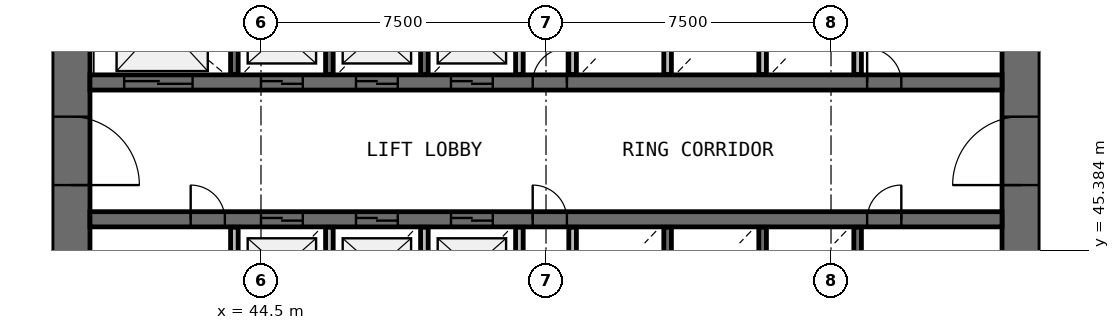
"""IFC4 building model, lengths in metres.
Left out: names, types, materials, properties, quantities, classifications, styles, units other than length and angle.
Written with IfcOpenShell. Run it as: python <this file> out.ifc"""

import sys

from ifc_helpers import new_model, si_unit, direction, frame, frame_2d, origin, place, context, subcontext, project, spatial, rectangle, extrude, source, transform, mapped, element, fill, save


model = new_model("IFC4")
c1 = context("Model", 3, precision=1e-05, world=origin(), true_north=direction((0.0, 1.0)))
c2 = subcontext(c1, "Body", "Model", "MODEL_VIEW")
j1 = project(units=[si_unit("LENGTHUNIT", "METRE"), si_unit("PLANEANGLEUNIT", "RADIAN")], contexts=[c1])
p1 = place(None, origin())
s1 = spatial("IfcSite", under=j1, at=p1, CompositionType="ELEMENT")
p2 = place(p1, origin())
s2 = spatial("IfcBuilding", under=s1, at=p2, CompositionType="ELEMENT")
p3 = place(p2, frame((0.0, 0.0, 44.6)))
s3 = spatial("IfcBuildingStorey", under=s2, at=p3, CompositionType="ELEMENT", Elevation=44.6)
p4 = place(p3, frame((64.5, 38.0, 0.0), z_axis=(0.0, 0.0, 1.0), x_axis=(0.0, 1.0, 0.0)))
e1 = element("IfcWall", 1, at=p4, inside=s3, PredefinedType="SHEAR", context=c2, shape_type="SweptSolid", body=[
    extrude(rectangle(XDim=20.0, YDim=1.0, at=frame_2d((10.0, 0.0))), origin(), (0.0, 0.0, 1.0), 4.4),
])
p5 = place(p4, frame((9.1, 0.0, 0.0)))
e2 = element("IfcOpeningElement", 2, at=p5, cuts=e1, PredefinedType="OPENING", context=c2, shape_type="SweptSolid", body=[
    extrude(rectangle(XDim=1.8, YDim=2.1, at=frame_2d((0.9, 1.05))), frame((0.0, 0.51, 0.0), z_axis=(0.0, -1.0, 0.0), x_axis=(1.0, 0.0, 0.0)), (0.0, 0.0, 1.0), 1.02),
])
p6 = place(p3, frame((39.5, 58.0, 0.0), z_axis=(0.0, 0.0, 1.0), x_axis=(0.0, -1.0, 0.0)))
e3 = element("IfcWall", 3, at=p6, inside=s3, PredefinedType="SHEAR", context=c2, shape_type="SweptSolid", body=[
    extrude(rectangle(XDim=20.0, YDim=1.0, at=frame_2d((10.0, 0.0))), origin(), (0.0, 0.0, 1.0), 4.4),
])
p7 = place(p6, frame((9.1, 0.0, 0.0)))
e4 = element("IfcOpeningElement", 4, at=p7, cuts=e3, PredefinedType="OPENING", context=c2, shape_type="SweptSolid", body=[
    extrude(rectangle(XDim=1.8, YDim=2.1, at=frame_2d((0.9, 1.05))), frame((0.0, 0.51, 0.0), z_axis=(0.0, -1.0, 0.0), x_axis=(1.0, 0.0, 0.0)), (0.0, 0.0, 1.0), 1.02),
])
p8 = place(p3, frame((40.0, 49.8, 0.0), z_axis=(0.0, 0.0, 1.0), x_axis=(1.0, 0.0, 0.0)))
e5 = element("IfcWall", 5, at=p8, inside=s3, PredefinedType="SHEAR", context=c2, shape_type="SweptSolid", body=[
    extrude(rectangle(XDim=24.0, YDim=0.4, at=frame_2d((12.0, 0.0))), origin(), (0.0, 0.0, 1.0), 4.4),
])
p9 = place(p8, frame((4.5, 0.0, 0.0)))
e6 = element("IfcOpeningElement", 6, at=p9, cuts=e5, PredefinedType="OPENING", context=c2, shape_type="SweptSolid", body=[
    extrude(rectangle(XDim=1.1, YDim=2.1, at=frame_2d((0.55, 1.05))), frame((0.0, 0.21, 0.0), z_axis=(0.0, -1.0, 0.0), x_axis=(1.0, 0.0, 0.0)), (0.0, 0.0, 1.0), 0.42),
])
p10 = place(p8, frame((7.0, 0.0, 0.0)))
e7 = element("IfcOpeningElement", 7, at=p10, cuts=e5, PredefinedType="OPENING", context=c2, shape_type="SweptSolid", body=[
    extrude(rectangle(XDim=1.1, YDim=2.1, at=frame_2d((0.55, 1.05))), frame((0.0, 0.21, 0.0), z_axis=(0.0, -1.0, 0.0), x_axis=(1.0, 0.0, 0.0)), (0.0, 0.0, 1.0), 0.42),
])
p11 = place(p8, frame((9.5, 0.0, 0.0)))
e8 = element("IfcOpeningElement", 8, at=p11, cuts=e5, PredefinedType="OPENING", context=c2, shape_type="SweptSolid", body=[
    extrude(rectangle(XDim=1.1, YDim=2.1, at=frame_2d((0.55, 1.05))), frame((0.0, 0.21, 0.0), z_axis=(0.0, -1.0, 0.0), x_axis=(1.0, 0.0, 0.0)), (0.0, 0.0, 1.0), 0.42),
])
p12 = place(p8, frame((0.9, 0.0, 0.0)))
e9 = element("IfcOpeningElement", 9, at=p12, cuts=e5, PredefinedType="OPENING", context=c2, shape_type="SweptSolid", body=[
    extrude(rectangle(XDim=1.8, YDim=2.4, at=frame_2d((0.9, 1.2))), frame((0.0, 0.21, 0.0), z_axis=(0.0, -1.0, 0.0), x_axis=(1.0, 0.0, 0.0)), (0.0, 0.0, 1.0), 0.42),
])
p13 = place(p8, frame((20.45, 0.0, 0.0)))
e10 = element("IfcOpeningElement", 10, at=p13, cuts=e5, PredefinedType="OPENING", context=c2, shape_type="SweptSolid", body=[
    extrude(rectangle(XDim=0.9, YDim=2.1, at=frame_2d((0.45, 1.05))), frame((0.0, 0.21, 0.0), z_axis=(0.0, -1.0, 0.0), x_axis=(1.0, 0.0, 0.0)), (0.0, 0.0, 1.0), 0.42),
])
p14 = place(p8, frame((11.65, 0.0, 0.0)))
e11 = element("IfcOpeningElement", 11, at=p14, cuts=e5, PredefinedType="OPENING", context=c2, shape_type="SweptSolid", body=[
    extrude(rectangle(XDim=0.9, YDim=2.1, at=frame_2d((0.45, 1.05))), frame((0.0, 0.21, 0.0), z_axis=(0.0, -1.0, 0.0), x_axis=(1.0, 0.0, 0.0)), (0.0, 0.0, 1.0), 0.42),
])
p15 = place(p3, frame((40.0, 46.2, 0.0), z_axis=(0.0, 0.0, 1.0), x_axis=(1.0, 0.0, 0.0)))
e12 = element("IfcWall", 12, at=p15, inside=s3, PredefinedType="SHEAR", context=c2, shape_type="SweptSolid", body=[
    extrude(rectangle(XDim=24.0, YDim=0.4, at=frame_2d((12.0, 0.0))), origin(), (0.0, 0.0, 1.0), 4.4),
])
p16 = place(p15, frame((4.5, 0.0, 0.0)))
e13 = element("IfcOpeningElement", 13, at=p16, cuts=e12, PredefinedType="OPENING", context=c2, shape_type="SweptSolid", body=[
    extrude(rectangle(XDim=1.1, YDim=2.1, at=frame_2d((0.55, 1.05))), frame((0.0, 0.21, 0.0), z_axis=(0.0, -1.0, 0.0), x_axis=(1.0, 0.0, 0.0)), (0.0, 0.0, 1.0), 0.42),
])
p17 = place(p15, frame((7.0, 0.0, 0.0)))
e14 = element("IfcOpeningElement", 14, at=p17, cuts=e12, PredefinedType="OPENING", context=c2, shape_type="SweptSolid", body=[
    extrude(rectangle(XDim=1.1, YDim=2.1, at=frame_2d((0.55, 1.05))), frame((0.0, 0.21, 0.0), z_axis=(0.0, -1.0, 0.0), x_axis=(1.0, 0.0, 0.0)), (0.0, 0.0, 1.0), 0.42),
])
p18 = place(p15, frame((9.5, 0.0, 0.0)))
e15 = element("IfcOpeningElement", 15, at=p18, cuts=e12, PredefinedType="OPENING", context=c2, shape_type="SweptSolid", body=[
    extrude(rectangle(XDim=1.1, YDim=2.1, at=frame_2d((0.55, 1.05))), frame((0.0, 0.21, 0.0), z_axis=(0.0, -1.0, 0.0), x_axis=(1.0, 0.0, 0.0)), (0.0, 0.0, 1.0), 0.42),
])
p19 = place(p15, frame((20.45, 0.0, 0.0)))
e16 = element("IfcOpeningElement", 16, at=p19, cuts=e12, PredefinedType="OPENING", context=c2, shape_type="SweptSolid", body=[
    extrude(rectangle(XDim=0.9, YDim=2.1, at=frame_2d((0.45, 1.05))), frame((0.0, 0.21, 0.0), z_axis=(0.0, -1.0, 0.0), x_axis=(1.0, 0.0, 0.0)), (0.0, 0.0, 1.0), 0.42),
])
p20 = place(p15, frame((2.65, 0.0, 0.0)))
e17 = element("IfcOpeningElement", 17, at=p20, cuts=e12, PredefinedType="OPENING", context=c2, shape_type="SweptSolid", body=[
    extrude(rectangle(XDim=0.9, YDim=2.1, at=frame_2d((0.45, 1.05))), frame((0.0, 0.21, 0.0), z_axis=(0.0, -1.0, 0.0), x_axis=(1.0, 0.0, 0.0)), (0.0, 0.0, 1.0), 0.42),
])
p21 = place(p15, frame((11.65, 0.0, 0.0)))
e18 = element("IfcOpeningElement", 18, at=p21, cuts=e12, PredefinedType="OPENING", context=c2, shape_type="SweptSolid", body=[
    extrude(rectangle(XDim=0.9, YDim=2.1, at=frame_2d((0.45, 1.05))), frame((0.0, 0.21, 0.0), z_axis=(0.0, -1.0, 0.0), x_axis=(1.0, 0.0, 0.0)), (0.0, 0.0, 1.0), 0.42),
])
for number, where, z_axis, x_axis in (
    (19, (43.8, 45.99, 0.0), (0.0, 0.0, 1.0), (0.0, -1.0, 0.0)),
    (20, (43.8, 52.37, 0.0), (0.0, 0.0, 1.0), (0.0, -1.0, 0.0)),
):
    element("IfcWall", number, at=place(p3, frame(where, z_axis=z_axis, x_axis=x_axis)), inside=s3, PredefinedType="SOLIDWALL", context=c2, shape_type="SweptSolid", body=[
        extrude(rectangle(XDim=2.36, YDim=0.2, at=frame_2d((1.18, 0.0))), origin(), (0.0, 0.0, 1.0), 3.95),
    ])
p22 = place(p3, frame((46.3, 43.6, 0.0), z_axis=(0.0, 0.0, 1.0), x_axis=(0.0, 1.0, 0.0)))
e21 = element("IfcWall", 21, at=p22, inside=s3, PredefinedType="SOLIDWALL", context=c2, shape_type="SweptSolid", body=[
    extrude(rectangle(XDim=2.39, YDim=0.2, at=frame_2d((1.195, 0.0))), origin(), (0.0, 0.0, 1.0), 3.95),
])
for number, where, z_axis, x_axis in (
    (22, (46.3, 50.01, 0.0), (0.0, 0.0, 1.0), (0.0, 1.0, 0.0)),
    (23, (48.8, 43.63, 0.0), (0.0, 0.0, 1.0), (0.0, 1.0, 0.0)),
    (24, (48.8, 50.01, 0.0), (0.0, 0.0, 1.0), (0.0, 1.0, 0.0)),
    (25, (51.3, 43.63, 0.0), (0.0, 0.0, 1.0), (0.0, 1.0, 0.0)),
):
    element("IfcWall", number, at=place(p3, frame(where, z_axis=z_axis, x_axis=x_axis)), inside=s3, PredefinedType="SOLIDWALL", context=c2, shape_type="SweptSolid", body=[
        extrude(rectangle(XDim=2.36, YDim=0.2, at=frame_2d((1.18, 0.0))), origin(), (0.0, 0.0, 1.0), 3.95),
    ])
for number, where, z_axis, x_axis in (
    (26, (51.3, 50.01, 0.0), (0.0, 0.0, 1.0), (0.0, 1.0, 0.0)),
    (27, (52.7, 45.99, 0.0), (0.0, 0.0, 1.0), (0.0, -1.0, 0.0)),
):
    element("IfcWall", number, at=place(p3, frame(where, z_axis=z_axis, x_axis=x_axis)), inside=s3, PredefinedType="SOLIDWALL", context=c2, shape_type="SweptSolid", body=[
        extrude(rectangle(XDim=2.39, YDim=0.2, at=frame_2d((1.195, 0.0))), origin(), (0.0, 0.0, 1.0), 3.95),
    ])
for number, where, z_axis, x_axis in (
    (28, (52.7, 52.37, 0.0), (0.0, 0.0, 1.0), (0.0, -1.0, 0.0)),
    (29, (55.2, 43.63, 0.0), (0.0, 0.0, 1.0), (0.0, 1.0, 0.0)),
    (30, (55.2, 50.01, 0.0), (0.0, 0.0, 1.0), (0.0, 1.0, 0.0)),
    (31, (57.7, 43.63, 0.0), (0.0, 0.0, 1.0), (0.0, 1.0, 0.0)),
):
    element("IfcWall", number, at=place(p3, frame(where, z_axis=z_axis, x_axis=x_axis)), inside=s3, PredefinedType="SOLIDWALL", context=c2, shape_type="SweptSolid", body=[
        extrude(rectangle(XDim=2.36, YDim=0.2, at=frame_2d((1.18, 0.0))), origin(), (0.0, 0.0, 1.0), 3.95),
    ])
p23 = place(p3, frame((57.7, 50.01, 0.0), z_axis=(0.0, 0.0, 1.0), x_axis=(0.0, 1.0, 0.0)))
e32 = element("IfcWall", 32, at=p23, inside=s3, PredefinedType="SOLIDWALL", context=c2, shape_type="SweptSolid", body=[
    extrude(rectangle(XDim=2.39, YDim=0.2, at=frame_2d((1.195, 0.0))), origin(), (0.0, 0.0, 1.0), 3.95),
])
for number, where, z_axis, x_axis in (
    (33, (60.2, 43.63, 0.0), (0.0, 0.0, 1.0), (0.0, 1.0, 0.0)),
    (34, (60.2, 50.01, 0.0), (0.0, 0.0, 1.0), (0.0, 1.0, 0.0)),
):
    element("IfcWall", number, at=place(p3, frame(where, z_axis=z_axis, x_axis=x_axis)), inside=s3, PredefinedType="SOLIDWALL", context=c2, shape_type="SweptSolid", body=[
        extrude(rectangle(XDim=2.36, YDim=0.2, at=frame_2d((1.18, 0.0))), origin(), (0.0, 0.0, 1.0), 3.95),
    ])
m1 = source(origin(), c2, "Body", "SweptSolid", [
    extrude(rectangle(XDim=1.8, YDim=2.1, at=frame_2d((0.9, 1.05))), frame((0.0, 0.025, 0.0), z_axis=(0.0, -1.0, 0.0), x_axis=(1.0, 0.0, 0.0)), (0.0, 0.0, 1.0), 0.05),
])
p24 = place(p7, origin())
e35 = element("IfcDoor", 35, at=p24, inside=s3, OperationType="SINGLE_SWING_RIGHT", PredefinedType="DOOR", context=c2, shape_type="MappedRepresentation", body=[
    mapped(m1, transform((0.0, 0.0, 0.0), scale=1.0)),
])
fill(e4, e35)
p25 = place(p5, origin())
e36 = element("IfcDoor", 36, at=p25, inside=s3, OperationType="SINGLE_SWING_LEFT", PredefinedType="DOOR", context=c2, shape_type="MappedRepresentation", body=[
    mapped(m1, transform((0.0, 0.0, 0.0), scale=1.0)),
])
fill(e2, e36)
m2 = source(origin(), c2, "Body", "SweptSolid", [
    extrude(rectangle(XDim=1.1, YDim=2.1, at=frame_2d((0.55, 1.05))), frame((0.0, 0.025, 0.0), z_axis=(0.0, -1.0, 0.0), x_axis=(1.0, 0.0, 0.0)), (0.0, 0.0, 1.0), 0.05),
])
p26 = place(p9, origin())
e37 = element("IfcDoor", 37, at=p26, inside=s3, OperationType="DOUBLE_DOOR_SLIDING", PredefinedType="USERDEFINED", context=c2, shape_type="MappedRepresentation", body=[
    mapped(m2, transform((0.0, 0.0, 0.0), scale=1.0)),
])
fill(e6, e37)
p27 = place(p10, origin())
e38 = element("IfcDoor", 38, at=p27, inside=s3, OperationType="DOUBLE_DOOR_SLIDING", PredefinedType="USERDEFINED", context=c2, shape_type="MappedRepresentation", body=[
    mapped(m2, transform((0.0, 0.0, 0.0), scale=1.0)),
])
fill(e7, e38)
p28 = place(p11, origin())
e39 = element("IfcDoor", 39, at=p28, inside=s3, OperationType="DOUBLE_DOOR_SLIDING", PredefinedType="USERDEFINED", context=c2, shape_type="MappedRepresentation", body=[
    mapped(m2, transform((0.0, 0.0, 0.0), scale=1.0)),
])
fill(e8, e39)
p29 = place(p16, origin())
e40 = element("IfcDoor", 40, at=p29, inside=s3, OperationType="DOUBLE_DOOR_SLIDING", PredefinedType="USERDEFINED", context=c2, shape_type="MappedRepresentation", body=[
    mapped(m2, transform((0.0, 0.0, 0.0), scale=1.0)),
])
fill(e13, e40)
p30 = place(p17, origin())
e41 = element("IfcDoor", 41, at=p30, inside=s3, OperationType="DOUBLE_DOOR_SLIDING", PredefinedType="USERDEFINED", context=c2, shape_type="MappedRepresentation", body=[
    mapped(m2, transform((0.0, 0.0, 0.0), scale=1.0)),
])
fill(e14, e41)
p31 = place(p18, origin())
e42 = element("IfcDoor", 42, at=p31, inside=s3, OperationType="DOUBLE_DOOR_SLIDING", PredefinedType="USERDEFINED", context=c2, shape_type="MappedRepresentation", body=[
    mapped(m2, transform((0.0, 0.0, 0.0), scale=1.0)),
])
fill(e15, e42)
m3 = source(origin(), c2, "Body", "SweptSolid", [
    extrude(rectangle(XDim=1.8, YDim=2.4, at=frame_2d((0.9, 1.2))), frame((0.0, 0.025, 0.0), z_axis=(0.0, -1.0, 0.0), x_axis=(1.0, 0.0, 0.0)), (0.0, 0.0, 1.0), 0.05),
])
p32 = place(p12, origin())
e43 = element("IfcDoor", 43, at=p32, inside=s3, OperationType="DOUBLE_DOOR_SLIDING", PredefinedType="USERDEFINED", context=c2, shape_type="MappedRepresentation", body=[
    mapped(m3, transform((0.0, 0.0, 0.0), scale=1.0)),
])
fill(e9, e43)
m4 = source(origin(), c2, "Body", "SweptSolid", [
    extrude(rectangle(XDim=0.9, YDim=2.1, at=frame_2d((0.45, 1.05))), frame((0.0, 0.025, 0.0), z_axis=(0.0, -1.0, 0.0), x_axis=(1.0, 0.0, 0.0)), (0.0, 0.0, 1.0), 0.05),
])
p33 = place(p19, origin())
e44 = element("IfcDoor", 44, at=p33, inside=s3, OperationType="SINGLE_SWING_RIGHT", PredefinedType="DOOR", context=c2, shape_type="MappedRepresentation", body=[
    mapped(m4, transform((0.0, 0.0, 0.0), scale=1.0)),
])
fill(e16, e44)
p34 = place(p13, origin())
e45 = element("IfcDoor", 45, at=p34, inside=s3, OperationType="SINGLE_SWING_LEFT", PredefinedType="DOOR", context=c2, shape_type="MappedRepresentation", body=[
    mapped(m4, transform((0.0, 0.0, 0.0), scale=1.0)),
])
fill(e10, e45)
p35 = place(p20, origin())
e46 = element("IfcDoor", 46, at=p35, inside=s3, OperationType="SINGLE_SWING_LEFT", PredefinedType="DOOR", context=c2, shape_type="MappedRepresentation", body=[
    mapped(m4, transform((0.0, 0.0, 0.0), scale=1.0)),
])
fill(e17, e46)
p36 = place(p14, origin())
e47 = element("IfcDoor", 47, at=p36, inside=s3, OperationType="SINGLE_SWING_RIGHT", PredefinedType="DOOR", context=c2, shape_type="MappedRepresentation", body=[
    mapped(m4, transform((0.0, 0.0, 0.0), scale=1.0)),
])
fill(e11, e47)
p37 = place(p21, origin())
e48 = element("IfcDoor", 48, at=p37, inside=s3, OperationType="SINGLE_SWING_LEFT", PredefinedType="DOOR", context=c2, shape_type="MappedRepresentation", body=[
    mapped(m4, transform((0.0, 0.0, 0.0), scale=1.0)),
])
fill(e18, e48)
save(model, sys.argv[1])
